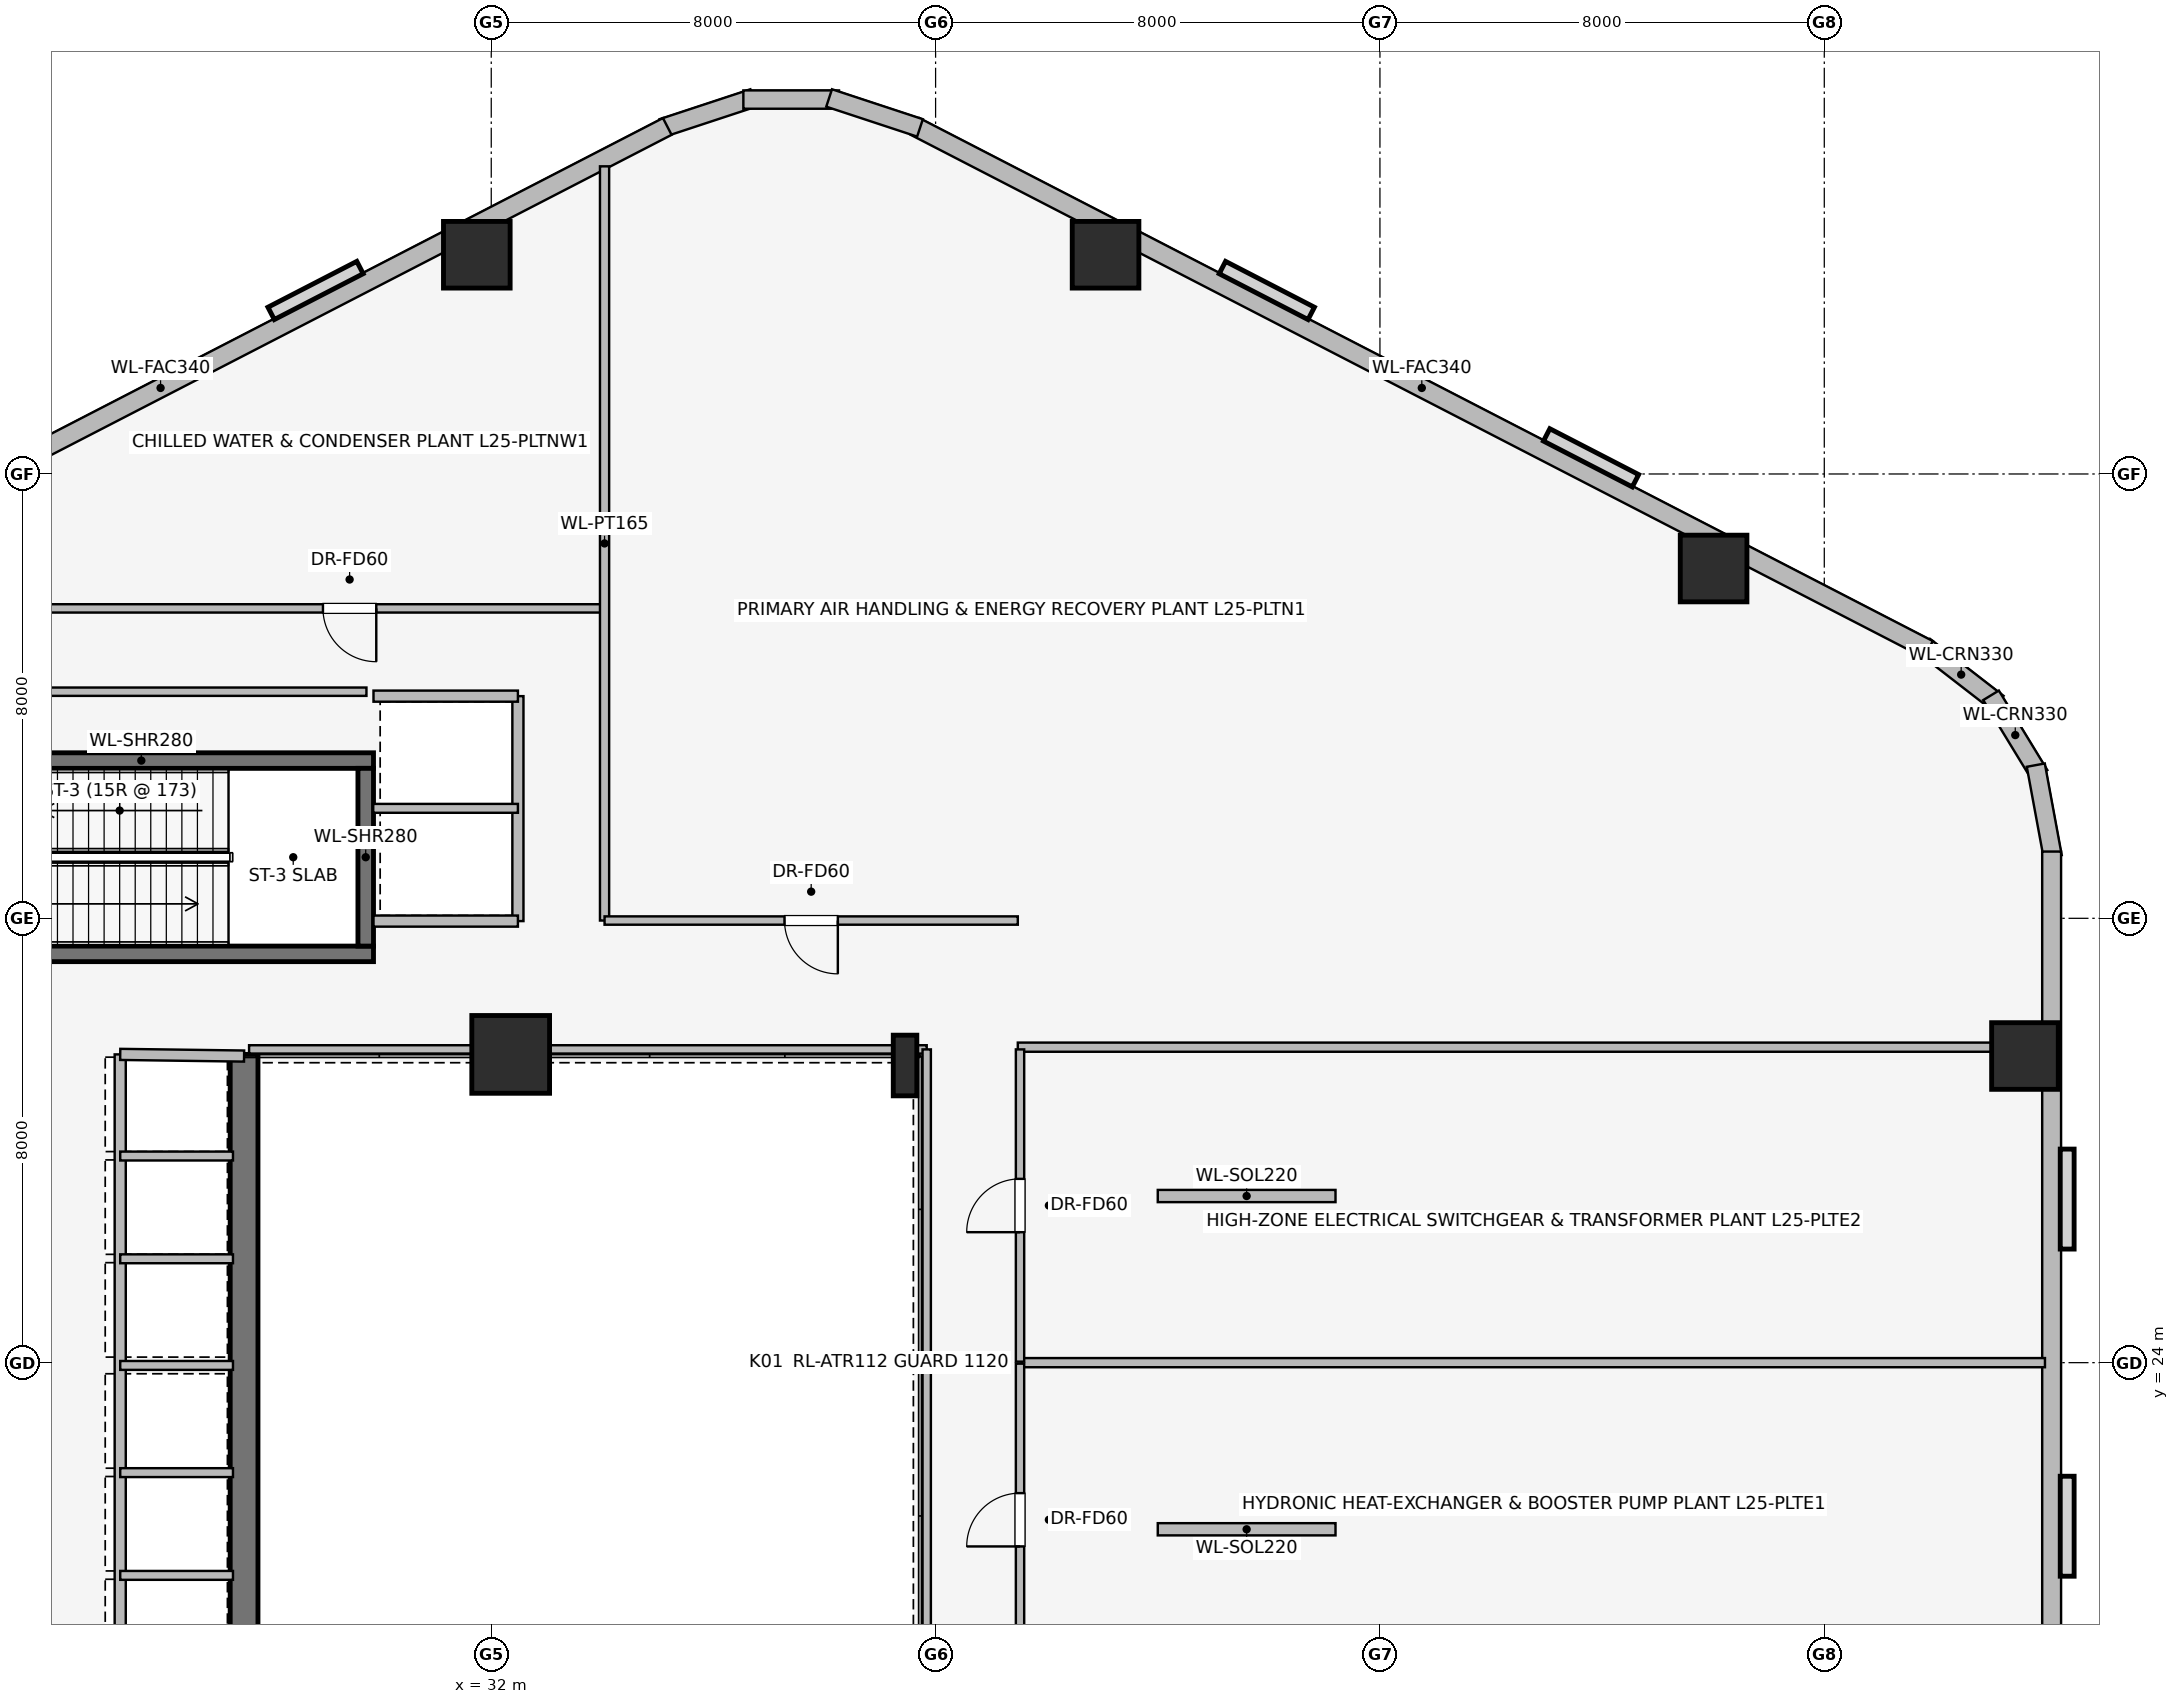
"""IFC4 building model, lengths in metres.
Left out: names, types, materials, properties, quantities, classifications, styles, units other than length and angle.
Written with IfcOpenShell. Run it as: python <this file> out.ifc"""

import sys

from ifc_helpers import new_model, si_unit, direction, frame, frame_2d, origin, origin_2d, place, context, subcontext, project, spatial, rectangle, i_section, extrude, element, fill, save


model = new_model("IFC4")
c1 = context("Model", 3, precision=1e-05, world=origin(), true_north=direction((0.0, 1.0)))
c2 = subcontext(c1, "Body", "Model", "MODEL_VIEW")
j1 = project(units=[si_unit("LENGTHUNIT", "METRE"), si_unit("PLANEANGLEUNIT", "RADIAN")], contexts=[c1])
p1 = place(None, origin())
s1 = spatial("IfcSite", under=j1, at=p1, CompositionType="ELEMENT")
p2 = place(p1, origin())
s2 = spatial("IfcBuilding", under=s1, at=p2, CompositionType="ELEMENT")
p3 = place(p2, frame((0.0, 0.0, 96.35)))
s3 = spatial("IfcBuildingStorey", under=s2, at=p3, CompositionType="ELEMENT", Elevation=96.35)
p4 = place(p3, frame((27.55, 29.55, 0.0), z_axis=(0.0, 0.0, 1.0), x_axis=(0.0, -1.0, 0.0)))
e1 = element("IfcWall", 1, at=p4, inside=s3, PredefinedType="SHEAR", context=c2, shape_type="SweptSolid", body=[
    extrude(rectangle(XDim=11.25, YDim=0.5, at=frame_2d((5.625, 0.0))), origin(), (0.0, 0.0, 1.0), 5.2),
])
p5 = place(p3, frame((21.52, 31.36, 0.0), z_axis=(0.0, 0.0, 1.0), x_axis=(1.0, 0.0, 0.0)))
e2 = element("IfcWall", 2, at=p5, inside=s3, PredefinedType="SHEAR", context=c2, shape_type="SweptSolid", body=[
    extrude(rectangle(XDim=8.36, YDim=0.28, at=frame_2d((4.18, 0.0))), origin(), (0.0, 0.0, 1.0), 5.2),
])
p6 = place(p5, frame((0.45, 0.0, 0.0)))
e3 = element("IfcOpeningElement", 3, at=p6, cuts=e2, PredefinedType="OPENING", context=c2, shape_type="SweptSolid", body=[
    extrude(rectangle(XDim=1.05, YDim=2.0, at=frame_2d((0.525, 1.0))), frame((0.0, 0.15, 0.0), z_axis=(0.0, -1.0, 0.0), x_axis=(1.0, 0.0, 0.0)), (0.0, 0.0, 1.0), 0.3),
])
p7 = place(p3, frame((29.88, 34.84, 0.0), z_axis=(0.0, 0.0, 1.0), x_axis=(-1.0, 0.0, 0.0)))
e4 = element("IfcWall", 4, at=p7, inside=s3, PredefinedType="SHEAR", context=c2, shape_type="SweptSolid", body=[
    extrude(rectangle(XDim=8.36, YDim=0.28, at=frame_2d((4.18, 0.0))), origin(), (0.0, 0.0, 1.0), 5.2),
])
p8 = place(p3, frame((29.74, 31.5, 0.0), z_axis=(0.0, 0.0, 1.0), x_axis=(0.0, 1.0, 0.0)))
e5 = element("IfcWall", 5, at=p8, inside=s3, PredefinedType="SHEAR", context=c2, shape_type="SweptSolid", body=[
    extrude(rectangle(XDim=3.2, YDim=0.28, at=frame_2d((1.6, 0.0))), origin(), (0.0, 0.0, 1.0), 5.2),
])
p9 = place(p3, frame((32.35, 29.55, 0.0), z_axis=(0.0, 0.0, 1.0), x_axis=(1.0, 0.0, 0.0)))
e6 = element("IfcColumn", 6, at=p9, inside=s3, PredefinedType="COLUMN", context=c2, shape_type="SweptSolid", body=[
    extrude(rectangle(XDim=1.4, YDim=1.4, at=origin_2d()), origin(), (0.0, 0.0, 1.0), 5.2),
])
for number, where, z_axis, x_axis in (
    (7, (54.007, 38.298, 0.0), (0.0, 0.0, 1.0), (1.0, 0.0, 0.0)),
    (8, (43.06, 43.947, 0.0), (0.0, 0.0, 1.0), (1.0, 0.0, 0.0)),
    (9, (31.74, 43.947, 0.0), (0.0, 0.0, 1.0), (1.0, 0.0, 0.0)),
    (10, (59.613, 29.521, 0.0), (0.0, 0.0, 1.0), (1.0, 0.0, 0.0)),
):
    element("IfcColumn", number, at=place(p3, frame(where, z_axis=z_axis, x_axis=x_axis)), inside=s3, PredefinedType="COLUMN", context=c2, shape_type="SweptSolid", body=[
        extrude(rectangle(XDim=1.2, YDim=1.2, at=origin_2d()), origin(), (0.0, 0.0, 1.0), 5.2),
    ])
p10 = place(p3, frame((39.45, 29.35, 0.0), z_axis=(0.0, 0.0, 1.0), x_axis=(1.0, 0.0, 0.0)))
e11 = element("IfcColumn", 11, at=p10, inside=s3, PredefinedType="COLUMN", context=c2, shape_type="SweptSolid", body=[
    extrude(i_section(OverallWidth=0.424, OverallDepth=1.092, WebThickness=0.045, FlangeThickness=0.082, at=origin_2d()), origin(), (0.0, 0.0, 1.0), 5.2),
])
p11 = place(p3, frame((57.802, 36.901, 0.0), z_axis=(0.0, 0.0, 1.0), x_axis=(0.790691856293, -0.61221433207, 0.0)))
e12 = element("IfcWall", 12, at=p11, inside=s3, PredefinedType="STANDARD", context=c2, shape_type="SweptSolid", body=[
    extrude(rectangle(XDim=1.676, YDim=0.33, at=frame_2d((0.838, 0.0))), origin(), (0.0, 0.0, 1.0), 4.78),
])
p12 = place(p3, frame((59.002, 36.015, 0.0), z_axis=(0.0, 0.0, 1.0), x_axis=(0.520584129191, -0.853810379671, 0.0)))
e13 = element("IfcWall", 13, at=p12, inside=s3, PredefinedType="STANDARD", context=c2, shape_type="SweptSolid", body=[
    extrude(rectangle(XDim=1.677, YDim=0.33, at=frame_2d((0.838, 0.0))), origin(), (0.0, 0.0, 1.0), 4.78),
])
p13 = place(p3, frame((59.808, 34.758, 0.0), z_axis=(0.0, 0.0, 1.0), x_axis=(0.181714143354, -0.983351397063, 0.0)))
e14 = element("IfcWall", 14, at=p13, inside=s3, PredefinedType="STANDARD", context=c2, shape_type="SweptSolid", body=[
    extrude(rectangle(XDim=1.678, YDim=0.33, at=frame_2d((0.839, 0.0))), origin(), (0.0, 0.0, 1.0), 4.78),
])
p14 = place(p3, frame((39.631, 46.257, 0.0), z_axis=(0.0, 0.0, 1.0), x_axis=(0.888634413993, -0.458616264721, 0.0)))
e15 = element("IfcWall", 15, at=p14, inside=s3, PredefinedType="STANDARD", context=c2, shape_type="SweptSolid", body=[
    extrude(rectangle(XDim=20.531, YDim=0.34, at=frame_2d((10.266, 0.0))), origin(), (0.0, 0.0, 1.0), 3.42),
])
p15 = place(p3, frame((35.081, 46.231, 0.0), z_axis=(0.0, 0.0, 1.0), x_axis=(0.94976901097, 0.312951794691, 0.0)))
e16 = element("IfcWall", 16, at=p15, inside=s3, PredefinedType="STANDARD", context=c2, shape_type="SweptSolid", body=[
    extrude(rectangle(XDim=1.722, YDim=0.33, at=frame_2d((0.861, 0.0))), origin(), (0.0, 0.0, 1.0), 4.78),
])
p16 = place(p3, frame((36.539, 46.741, 0.0), z_axis=(0.0, 0.0, 1.0), x_axis=(1.0, 0.0, 0.0)))
e17 = element("IfcWall", 17, at=p16, inside=s3, PredefinedType="STANDARD", context=c2, shape_type="SweptSolid", body=[
    extrude(rectangle(XDim=1.722, YDim=0.33, at=frame_2d((0.861, 0.0))), origin(), (0.0, 0.0, 1.0), 4.78),
])
p17 = place(p3, frame((38.083, 46.77, 0.0), z_axis=(0.0, 0.0, 1.0), x_axis=(0.94976901097, -0.312951794691, 0.0)))
e18 = element("IfcWall", 18, at=p17, inside=s3, PredefinedType="STANDARD", context=c2, shape_type="SweptSolid", body=[
    extrude(rectangle(XDim=1.722, YDim=0.33, at=frame_2d((0.861, 0.0))), origin(), (0.0, 0.0, 1.0), 4.78),
])
p18 = place(p3, frame((16.924, 36.841, 0.0), z_axis=(0.0, 0.0, 1.0), x_axis=(0.888634413993, 0.458616264721, 0.0)))
e19 = element("IfcWall", 19, at=p18, inside=s3, PredefinedType="STANDARD", context=c2, shape_type="SweptSolid", body=[
    extrude(rectangle(XDim=20.531, YDim=0.34, at=frame_2d((10.266, 0.0))), origin(), (0.0, 0.0, 1.0), 3.688),
])
p19 = place(p3, frame((60.093, 33.202, 0.0), z_axis=(0.0, 0.0, 1.0), x_axis=(0.0, -1.0, 0.0)))
e20 = element("IfcWall", 20, at=p19, inside=s3, PredefinedType="STANDARD", context=c2, shape_type="SweptSolid", body=[
    extrude(rectangle(XDim=18.404, YDim=0.34, at=frame_2d((9.202, 0.0))), origin(), (0.0, 0.0, 1.0), 3.688),
])
for number, where, z_axis, x_axis in (
    (21, (44.0, 21.0, 0.0), (0.0, 0.0, 1.0), (1.0, 0.0, 0.0)),
    (22, (44.0, 27.0, 0.0), (0.0, 0.0, 1.0), (1.0, 0.0, 0.0)),
):
    element("IfcWall", number, at=place(p3, frame(where, z_axis=z_axis, x_axis=x_axis)), inside=s3, PredefinedType="SOLIDWALL", context=c2, shape_type="SweptSolid", body=[
        extrude(rectangle(XDim=3.2, YDim=0.22, at=frame_2d((1.6, 0.0))), origin(), (0.0, 0.0, 1.0), 2.8),
    ])
p20 = place(p3, frame((32.48, 31.95, 0.0), z_axis=(0.0, 0.0, 1.0), x_axis=(0.0, 1.0, 0.0)))
e23 = element("IfcWall", 23, at=p20, inside=s3, PredefinedType="PARTITIONING", context=c2, shape_type="SweptSolid", body=[
    extrude(rectangle(XDim=4.05, YDim=0.2, at=frame_2d((2.025, 0.0))), origin(), (0.0, 0.0, 1.0), 3.688),
])
for number, where, z_axis, x_axis in (
    (24, (29.88, 36.0, 0.0), (0.0, 0.0, 1.0), (1.0, 0.0, 0.0)),
    (25, (32.48, 31.95, 0.0), (0.0, 0.0, 1.0), (-1.0, 0.0, 0.0)),
):
    element("IfcWall", number, at=place(p3, frame(where, z_axis=z_axis, x_axis=x_axis)), inside=s3, PredefinedType="PARTITIONING", context=c2, shape_type="SweptSolid", body=[
        extrude(rectangle(XDim=2.6, YDim=0.2, at=frame_2d((1.3, 0.0))), origin(), (0.0, 0.0, 1.0), 4.78),
    ])
p21 = place(p3, frame((29.875, 33.98, 0.0), z_axis=(0.0, 0.0, 1.0), x_axis=(1.0, 0.0, 0.0)))
e26 = element("IfcWall", 26, at=p21, inside=s3, PredefinedType="PARTITIONING", context=c2, shape_type="SweptSolid", body=[
    extrude(rectangle(XDim=2.605, YDim=0.16, at=frame_2d((1.302, 0.0))), origin(), (0.0, 0.0, 1.0), 4.78),
])
p22 = place(p3, frame((25.32, 29.55, 0.0), z_axis=(0.0, 0.0, 1.0), x_axis=(0.0, -1.0, 0.0)))
e27 = element("IfcWall", 27, at=p22, inside=s3, PredefinedType="PARTITIONING", context=c2, shape_type="SweptSolid", body=[
    extrude(rectangle(XDim=11.19, YDim=0.2, at=frame_2d((5.595, 0.0))), origin(), (0.0, 0.0, 1.0), 4.78),
])
p23 = place(p3, frame((27.55, 29.52, 0.0), z_axis=(0.0, 0.0, 1.0), x_axis=(-0.999909343457, 0.013464949556, 0.0)))
e28 = element("IfcWall", 28, at=p23, inside=s3, PredefinedType="PARTITIONING", context=c2, shape_type="SweptSolid", body=[
    extrude(rectangle(XDim=2.23, YDim=0.2, at=frame_2d((1.115, 0.0))), origin(), (0.0, 0.0, 1.0), 3.68),
])
p24 = place(p3, frame((25.32, 20.17, 0.0), z_axis=(0.0, 0.0, 1.0), x_axis=(1.0, 0.0, 0.0)))
e29 = element("IfcWall", 29, at=p24, inside=s3, PredefinedType="PARTITIONING", context=c2, shape_type="SweptSolid", body=[
    extrude(rectangle(XDim=2.03, YDim=0.16, at=frame_2d((1.015, 0.0))), origin(), (0.0, 0.0, 1.0), 3.68),
])
for number, where, z_axis, x_axis in (
    (30, (25.32, 22.02, 0.0), (0.0, 0.0, 1.0), (1.0, 0.0, 0.0)),
    (31, (25.32, 23.95, 0.0), (0.0, 0.0, 1.0), (1.0, 0.0, 0.0)),
    (32, (25.32, 25.87, 0.0), (0.0, 0.0, 1.0), (1.0, 0.0, 0.0)),
    (33, (25.32, 27.72, 0.0), (0.0, 0.0, 1.0), (1.0, 0.0, 0.0)),
):
    element("IfcWall", number, at=place(p3, frame(where, z_axis=z_axis, x_axis=x_axis)), inside=s3, PredefinedType="PARTITIONING", context=c2, shape_type="SweptSolid", body=[
        extrude(rectangle(XDim=2.03, YDim=0.16, at=frame_2d((1.015, 0.0))), origin(), (0.0, 0.0, 1.0), 4.78),
    ])
p25 = place(p3, frame((39.84, 29.64, 0.0), z_axis=(0.0, 0.0, 1.0), x_axis=(-1.0, 0.0, 0.0)))
e34 = element("IfcWall", 34, at=p25, inside=s3, PredefinedType="PARTITIONING", context=c2, shape_type="SweptSolid", body=[
    extrude(rectangle(XDim=12.2, YDim=0.15, at=frame_2d((6.1, 0.0))), origin(), (0.0, 0.0, 1.0), 3.921),
])
p26 = place(p3, frame((39.84, 18.36, 0.0), z_axis=(0.0, 0.0, 1.0), x_axis=(0.0, 1.0, 0.0)))
e35 = element("IfcWall", 35, at=p26, inside=s3, PredefinedType="PARTITIONING", context=c2, shape_type="SweptSolid", body=[
    extrude(rectangle(XDim=11.28, YDim=0.15, at=frame_2d((5.64, 0.0))), origin(), (0.0, 0.0, 1.0), 3.688),
])
p27 = place(p3, frame((34.0, 37.58, 0.0), z_axis=(0.0, 0.0, 1.0), x_axis=(-1.0, 0.0, 0.0)))
e36 = element("IfcWall", 36, at=p27, inside=s3, PredefinedType="PARTITIONING", context=c2, shape_type="SweptSolid", body=[
    extrude(rectangle(XDim=15.6, YDim=0.15, at=frame_2d((7.8, 0.0))), origin(), (0.0, 0.0, 1.0), 3.42),
])
p28 = place(p27, frame((4.07, 0.0, 0.0)))
e37 = element("IfcOpeningElement", 37, at=p28, cuts=e36, PredefinedType="OPENING", context=c2, shape_type="SweptSolid", body=[
    extrude(rectangle(XDim=0.96, YDim=2.0, at=frame_2d((0.48, 1.0))), frame((0.0, 0.085, 0.0), z_axis=(0.0, -1.0, 0.0), x_axis=(1.0, 0.0, 0.0)), (0.0, 0.0, 1.0), 0.17),
])
p29 = place(p3, frame((34.04, 31.96, 0.0), z_axis=(0.0, 0.0, 1.0), x_axis=(0.0, 1.0, 0.0)))
e38 = element("IfcWall", 38, at=p29, inside=s3, PredefinedType="PARTITIONING", context=c2, shape_type="SweptSolid", body=[
    extrude(rectangle(XDim=13.579, YDim=0.165, at=frame_2d((6.79, 0.0))), origin(), (0.0, 0.0, 1.0), 4.78),
])
p30 = place(p3, frame((41.48, 31.96, 0.0), z_axis=(0.0, 0.0, 1.0), x_axis=(-1.0, 0.0, 0.0)))
e39 = element("IfcWall", 39, at=p30, inside=s3, PredefinedType="PARTITIONING", context=c2, shape_type="SweptSolid", body=[
    extrude(rectangle(XDim=7.44, YDim=0.15, at=frame_2d((3.72, 0.0))), origin(), (0.0, 0.0, 1.0), 4.78),
])
p31 = place(p30, frame((3.24, 0.0, 0.0)))
e40 = element("IfcOpeningElement", 40, at=p31, cuts=e39, PredefinedType="OPENING", context=c2, shape_type="SweptSolid", body=[
    extrude(rectangle(XDim=0.96, YDim=2.0, at=frame_2d((0.48, 1.0))), frame((0.0, 0.085, 0.0), z_axis=(0.0, -1.0, 0.0), x_axis=(1.0, 0.0, 0.0)), (0.0, 0.0, 1.0), 0.17),
])
p32 = place(p3, frame((41.48, 29.68, 0.0), z_axis=(0.0, 0.0, 1.0), x_axis=(1.0, 0.0, 0.0)))
e41 = element("IfcWall", 41, at=p32, inside=s3, PredefinedType="PARTITIONING", context=c2, shape_type="SweptSolid", body=[
    extrude(rectangle(XDim=18.533, YDim=0.165, at=frame_2d((9.267, 0.0))), origin(), (0.0, 0.0, 1.0), 4.78),
])
p33 = place(p3, frame((41.55, 24.0, 0.0), z_axis=(0.0, 0.0, 1.0), x_axis=(1.0, 0.0, 0.0)))
e42 = element("IfcWall", 42, at=p33, inside=s3, PredefinedType="PARTITIONING", context=c2, shape_type="SweptSolid", body=[
    extrude(rectangle(XDim=18.423, YDim=0.165, at=frame_2d((9.211, 0.0))), origin(), (0.0, 0.0, 1.0), 4.78),
])
p34 = place(p3, frame((41.52, 18.36, 0.0), z_axis=(0.0, 0.0, 1.0), x_axis=(0.0, 1.0, 0.0)))
e43 = element("IfcWall", 43, at=p34, inside=s3, PredefinedType="PARTITIONING", context=c2, shape_type="SweptSolid", body=[
    extrude(rectangle(XDim=5.622, YDim=0.15, at=frame_2d((2.811, 0.0))), origin(), (0.0, 0.0, 1.0), 4.78),
])
p35 = place(p34, frame((2.331, 0.0, 0.0)))
e44 = element("IfcOpeningElement", 44, at=p35, cuts=e43, PredefinedType="OPENING", context=c2, shape_type="SweptSolid", body=[
    extrude(rectangle(XDim=0.96, YDim=2.0, at=frame_2d((0.48, 1.0))), frame((0.0, 0.085, 0.0), z_axis=(0.0, -1.0, 0.0), x_axis=(1.0, 0.0, 0.0)), (0.0, 0.0, 1.0), 0.17),
])
p36 = place(p3, frame((41.52, 24.018, 0.0), z_axis=(0.0, 0.0, 1.0), x_axis=(0.0, 1.0, 0.0)))
e45 = element("IfcWall", 45, at=p36, inside=s3, PredefinedType="PARTITIONING", context=c2, shape_type="SweptSolid", body=[
    extrude(rectangle(XDim=5.622, YDim=0.15, at=frame_2d((2.811, 0.0))), origin(), (0.0, 0.0, 1.0), 4.78),
])
p37 = place(p36, frame((2.331, 0.0, 0.0)))
e46 = element("IfcOpeningElement", 46, at=p37, cuts=e45, PredefinedType="OPENING", context=c2, shape_type="SweptSolid", body=[
    extrude(rectangle(XDim=0.96, YDim=2.0, at=frame_2d((0.48, 1.0))), frame((0.0, 0.085, 0.0), z_axis=(0.0, -1.0, 0.0), x_axis=(1.0, 0.0, 0.0)), (0.0, 0.0, 1.0), 0.17),
])
p38 = place(p3, frame((29.753, 36.08, 0.0), z_axis=(0.0, 0.0, 1.0), x_axis=(-1.0, 0.0, 0.0)))
e47 = element("IfcWall", 47, at=p38, inside=s3, PredefinedType="PARTITIONING", context=c2, shape_type="SweptSolid", body=[
    extrude(rectangle(XDim=7.353, YDim=0.15, at=frame_2d((3.677, 0.0))), origin(), (0.0, 0.0, 1.0), 4.78),
])
p39 = place(p28, origin())
e48 = element("IfcDoor", 48, at=p39, inside=s3, OperationType="SINGLE_SWING_LEFT", PredefinedType="DOOR", context=c2, shape_type="SweptSolid", body=[
    extrude(rectangle(XDim=0.96, YDim=2.0, at=frame_2d((0.48, 1.0))), frame((0.0, 0.025, 0.0), z_axis=(0.0, -1.0, 0.0), x_axis=(1.0, 0.0, 0.0)), (0.0, 0.0, 1.0), 0.05),
])
fill(e37, e48)
p40 = place(p31, origin())
e49 = element("IfcDoor", 49, at=p40, inside=s3, OperationType="SINGLE_SWING_LEFT", PredefinedType="DOOR", context=c2, shape_type="SweptSolid", body=[
    extrude(rectangle(XDim=0.96, YDim=2.0, at=frame_2d((0.48, 1.0))), frame((0.0, 0.025, 0.0), z_axis=(0.0, -1.0, 0.0), x_axis=(1.0, 0.0, 0.0)), (0.0, 0.0, 1.0), 0.05),
])
fill(e40, e49)
p41 = place(p35, origin())
e50 = element("IfcDoor", 50, at=p41, inside=s3, OperationType="SINGLE_SWING_LEFT", PredefinedType="DOOR", context=c2, shape_type="SweptSolid", body=[
    extrude(rectangle(XDim=0.96, YDim=2.0, at=frame_2d((0.48, 1.0))), frame((0.0, 0.025, 0.0), z_axis=(0.0, -1.0, 0.0), x_axis=(1.0, 0.0, 0.0)), (0.0, 0.0, 1.0), 0.05),
])
fill(e44, e50)
p42 = place(p37, origin())
e51 = element("IfcDoor", 51, at=p42, inside=s3, OperationType="SINGLE_SWING_LEFT", PredefinedType="DOOR", context=c2, shape_type="SweptSolid", body=[
    extrude(rectangle(XDim=0.96, YDim=2.0, at=frame_2d((0.48, 1.0))), frame((0.0, 0.025, 0.0), z_axis=(0.0, -1.0, 0.0), x_axis=(1.0, 0.0, 0.0)), (0.0, 0.0, 1.0), 0.05),
])
fill(e46, e51)
save(model, sys.argv[1])
